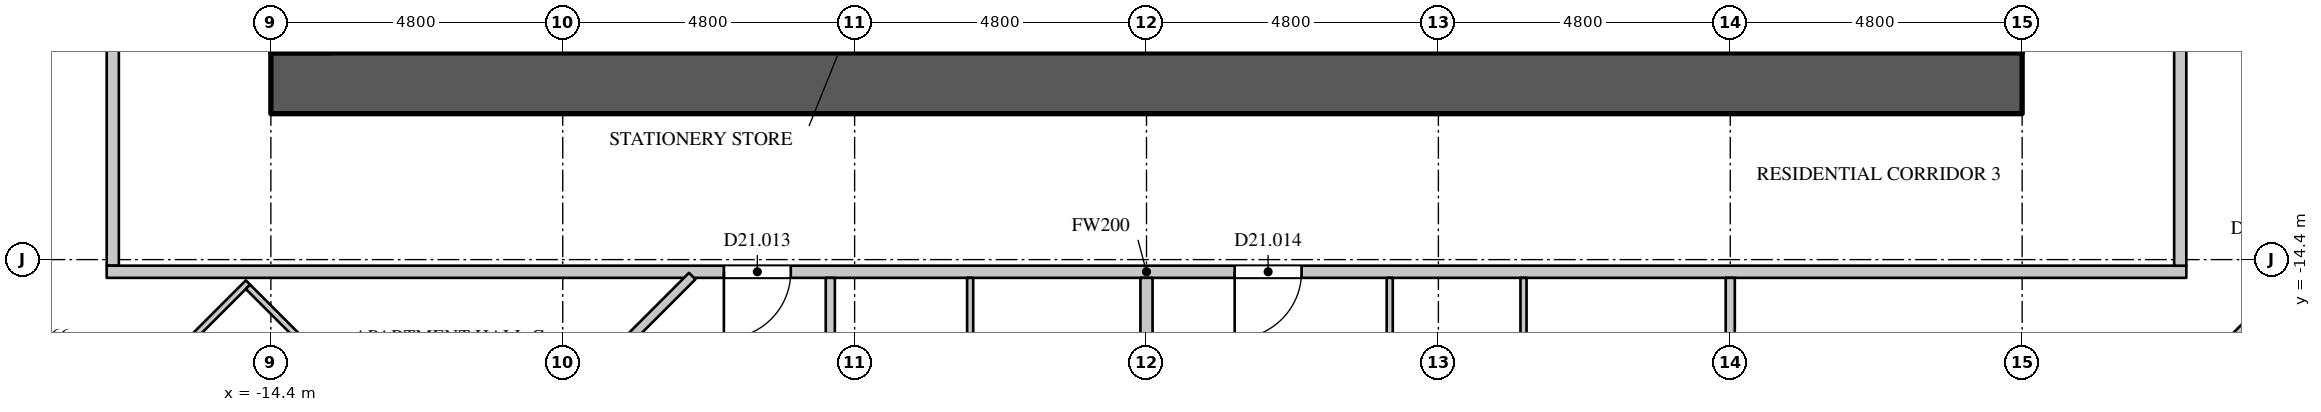
"""IFC4 building model, lengths in metres.
Left out: names, types, materials, properties, quantities, classifications, styles, units other than length and angle.
Written with IfcOpenShell. Run it as: python <this file> out.ifc"""

import sys

from ifc_helpers import new_model, si_unit, direction, frame, frame_2d, origin, place, context, subcontext, project, spatial, rectangle, extrude, element, fill, save


model = new_model("IFC4")
c1 = context("Model", 3, precision=1e-05, world=origin(), true_north=direction((0.0, 1.0)))
c2 = subcontext(c1, "Body", "Model", "MODEL_VIEW")
j1 = project(units=[si_unit("LENGTHUNIT", "METRE"), si_unit("PLANEANGLEUNIT", "RADIAN")], contexts=[c1])
p1 = place(None, origin())
s1 = spatial("IfcSite", under=j1, at=p1, CompositionType="ELEMENT")
p2 = place(p1, origin())
s2 = spatial("IfcBuilding", under=s1, at=p2, CompositionType="ELEMENT")
p3 = place(p2, frame((0.0, 0.0, 92.7)))
s3 = spatial("IfcBuildingStorey", under=s2, at=p3, CompositionType="ELEMENT", Elevation=92.7)
p4 = place(p3, frame((-14.4, -11.5, 0.0), z_axis=(0.0, 0.0, 1.0), x_axis=(1.0, 0.0, 0.0)))
e1 = element("IfcWall", 1, at=p4, inside=s3, PredefinedType="SHEAR", context=c2, shape_type="SweptSolid", body=[
    extrude(rectangle(XDim=28.8, YDim=1.0, at=frame_2d((14.4, 0.0))), origin(), (0.0, 0.0, 1.0), 4.2),
])
p5 = place(p3, frame((-17.0, -14.5, 0.0), z_axis=(0.0, 0.0, 1.0), x_axis=(0.0, 1.0, 0.0)))
e2 = element("IfcWall", 2, at=p5, inside=s3, PredefinedType="PARTITIONING", context=c2, shape_type="SweptSolid", body=[
    extrude(rectangle(XDim=29.0, YDim=0.2, at=frame_2d((14.5, 0.0))), origin(), (0.0, 0.0, 1.0), 3.798),
])
p6 = place(p5, frame((11.55, 0.0, 0.0)))
e3 = element("IfcOpeningElement", 3, at=p6, cuts=e2, PredefinedType="OPENING", context=c2, shape_type="SweptSolid", body=[
    extrude(rectangle(XDim=1.1, YDim=2.4, at=frame_2d((0.55, 1.2))), frame((0.0, 0.11, 0.0), z_axis=(0.0, -1.0, 0.0), x_axis=(1.0, 0.0, 0.0)), (0.0, 0.0, 1.0), 0.22),
])
p7 = place(p3, frame((-17.1, -14.6, 0.0), z_axis=(0.0, 0.0, 1.0), x_axis=(1.0, 0.0, 0.0)))
e4 = element("IfcWall", 4, at=p7, inside=s3, PredefinedType="PARTITIONING", context=c2, shape_type="SweptSolid", body=[
    extrude(rectangle(XDim=34.2, YDim=0.2, at=frame_2d((17.1, 0.0))), origin(), (0.0, 0.0, 1.0), 3.798),
])
p8 = place(p7, frame((10.15, 0.0, 0.0)))
e5 = element("IfcOpeningElement", 5, at=p8, cuts=e4, PredefinedType="OPENING", context=c2, shape_type="SweptSolid", body=[
    extrude(rectangle(XDim=1.1, YDim=2.4, at=frame_2d((0.55, 1.2))), frame((0.0, 0.11, 0.0), z_axis=(0.0, -1.0, 0.0), x_axis=(1.0, 0.0, 0.0)), (0.0, 0.0, 1.0), 0.22),
])
p9 = place(p7, frame((18.55, 0.0, 0.0)))
e6 = element("IfcOpeningElement", 6, at=p9, cuts=e4, PredefinedType="OPENING", context=c2, shape_type="SweptSolid", body=[
    extrude(rectangle(XDim=1.1, YDim=2.4, at=frame_2d((0.55, 1.2))), frame((0.0, 0.11, 0.0), z_axis=(0.0, -1.0, 0.0), x_axis=(1.0, 0.0, 0.0)), (0.0, 0.0, 1.0), 0.22),
])
p10 = place(p3, frame((17.0, -14.5, 0.0), z_axis=(0.0, 0.0, 1.0), x_axis=(0.0, 1.0, 0.0)))
e7 = element("IfcWall", 7, at=p10, inside=s3, PredefinedType="PARTITIONING", context=c2, shape_type="SweptSolid", body=[
    extrude(rectangle(XDim=29.0, YDim=0.2, at=frame_2d((14.5, 0.0))), origin(), (0.0, 0.0, 1.0), 3.798),
])
p11 = place(p10, frame((15.9, 0.0, 0.0)))
e8 = element("IfcOpeningElement", 8, at=p11, cuts=e7, PredefinedType="OPENING", context=c2, shape_type="SweptSolid", body=[
    extrude(rectangle(XDim=1.1, YDim=2.4, at=frame_2d((0.55, 1.2))), frame((0.0, 0.11, 0.0), z_axis=(0.0, -1.0, 0.0), x_axis=(1.0, 0.0, 0.0)), (0.0, 0.0, 1.0), 0.22),
])
p12 = place(p3, frame((-22.947, -12.051, 0.0), z_axis=(0.0, 0.0, 1.0), x_axis=(0.707106781187, -0.707106781187, 0.0)))
e9 = element("IfcWall", 9, at=p12, inside=s3, PredefinedType="PARTITIONING", context=c2, shape_type="SweptSolid", body=[
    extrude(rectangle(XDim=7.63, YDim=0.15, at=frame_2d((3.815, 0.0))), origin(), (0.0, 0.0, 1.0), 3.798),
])
p13 = place(p12, frame((4.65, 0.0, 0.0)))
e10 = element("IfcOpeningElement", 10, at=p13, cuts=e9, PredefinedType="OPENING", context=c2, shape_type="SweptSolid", body=[
    extrude(rectangle(XDim=0.95, YDim=2.2, at=frame_2d((0.475, 1.1))), frame((0.0, 0.085, 0.0), z_axis=(0.0, -1.0, 0.0), x_axis=(1.0, 0.0, 0.0)), (0.0, 0.0, 1.0), 0.17),
])
p14 = place(p3, frame((-9.547, -16.747, 0.0), z_axis=(0.0, 0.0, 1.0), x_axis=(0.707065207457, 0.707148352472, 0.0)))
e11 = element("IfcWall", 11, at=p14, inside=s3, PredefinedType="PARTITIONING", context=c2, shape_type="SweptSolid", body=[
    extrude(rectangle(XDim=2.936, YDim=0.15, at=frame_2d((1.468, 0.0))), origin(), (0.0, 0.0, 1.0), 3.798),
])
p15 = place(p3, frame((-5.2, -21.725, 0.0), z_axis=(0.0, 0.0, 1.0), x_axis=(0.0, 1.0, 0.0)))
e12 = element("IfcWall", 12, at=p15, inside=s3, PredefinedType="PARTITIONING", context=c2, shape_type="SweptSolid", body=[
    extrude(rectangle(XDim=7.025, YDim=0.15, at=frame_2d((3.513, 0.0))), origin(), (0.0, 0.0, 1.0), 3.798),
])
p16 = place(p15, frame((3.05, 0.0, 0.0)))
e13 = element("IfcOpeningElement", 13, at=p16, cuts=e12, PredefinedType="OPENING", context=c2, shape_type="SweptSolid", body=[
    extrude(rectangle(XDim=0.95, YDim=2.2, at=frame_2d((0.475, 1.1))), frame((0.0, 0.085, 0.0), z_axis=(0.0, -1.0, 0.0), x_axis=(1.0, 0.0, 0.0)), (0.0, 0.0, 1.0), 0.17),
])
p17 = place(p3, frame((9.6, -28.855, 0.0), z_axis=(0.0, 0.0, 1.0), x_axis=(0.0, 1.0, 0.0)))
e14 = element("IfcWall", 14, at=p17, inside=s3, PredefinedType="PARTITIONING", context=c2, shape_type="SweptSolid", body=[
    extrude(rectangle(XDim=14.155, YDim=0.15, at=frame_2d((7.078, 0.0))), origin(), (0.0, 0.0, 1.0), 3.798),
])
p18 = place(p17, frame((2.4, 0.0, 0.0)))
e15 = element("IfcOpeningElement", 15, at=p18, cuts=e14, PredefinedType="OPENING", context=c2, shape_type="SweptSolid", body=[
    extrude(rectangle(XDim=1.5, YDim=2.2, at=frame_2d((0.75, 1.1))), frame((0.0, 0.085, 0.0), z_axis=(0.0, -1.0, 0.0), x_axis=(1.0, 0.0, 0.0)), (0.0, 0.0, 1.0), 0.17),
])
p19 = place(p17, frame((10.2, 0.0, 0.0)))
e16 = element("IfcOpeningElement", 16, at=p19, cuts=e14, PredefinedType="OPENING", context=c2, shape_type="SweptSolid", body=[
    extrude(rectangle(XDim=0.95, YDim=2.2, at=frame_2d((0.475, 1.1))), frame((0.0, 0.085, 0.0), z_axis=(0.0, -1.0, 0.0), x_axis=(1.0, 0.0, 0.0)), (0.0, 0.0, 1.0), 0.17),
])
p20 = place(p3, frame((16.739, -16.845, 0.0), z_axis=(0.0, 0.0, 1.0), x_axis=(0.707130070773, 0.707083490833, 0.0)))
e17 = element("IfcWall", 17, at=p20, inside=s3, PredefinedType="PARTITIONING", context=c2, shape_type="SweptSolid", body=[
    extrude(rectangle(XDim=5.241, YDim=0.15, at=frame_2d((2.621, 0.0))), origin(), (0.0, 0.0, 1.0), 3.798),
])
p21 = place(p20, frame((3.3, 0.0, 0.0)))
e18 = element("IfcOpeningElement", 18, at=p21, cuts=e17, PredefinedType="OPENING", context=c2, shape_type="SweptSolid", body=[
    extrude(rectangle(XDim=0.95, YDim=2.2, at=frame_2d((0.475, 1.1))), frame((0.0, 0.085, 0.0), z_axis=(0.0, -1.0, 0.0), x_axis=(1.0, 0.0, 0.0)), (0.0, 0.0, 1.0), 0.17),
])
p22 = place(p3, frame((0.0, -28.855, 0.0), z_axis=(0.0, 0.0, 1.0), x_axis=(0.0, 1.0, 0.0)))
e19 = element("IfcWall", 19, at=p22, inside=s3, PredefinedType="PARTITIONING", context=c2, shape_type="SweptSolid", body=[
    extrude(rectangle(XDim=14.155, YDim=0.2, at=frame_2d((7.078, 0.0))), origin(), (0.0, 0.0, 1.0), 3.798),
])
p23 = place(p3, frame((-17.06, -17.06, 0.0), z_axis=(0.0, 0.0, 1.0), x_axis=(0.707106781187, 0.707106781187, 0.0)))
e20 = element("IfcWall", 20, at=p23, inside=s3, PredefinedType="PARTITIONING", context=c2, shape_type="SweptSolid", body=[
    extrude(rectangle(XDim=3.23, YDim=0.1, at=frame_2d((1.615, 0.0))), origin(), (0.0, 0.0, 1.0), 3.798),
])
p24 = place(p3, frame((-14.776, -14.847, 0.0), z_axis=(0.0, 0.0, 1.0), x_axis=(0.707106781187, -0.707106781187, 0.0)))
e21 = element("IfcWall", 21, at=p24, inside=s3, PredefinedType="PARTITIONING", context=c2, shape_type="SweptSolid", body=[
    extrude(rectangle(XDim=2.5, YDim=0.1, at=frame_2d((1.25, 0.0))), origin(), (0.0, 0.0, 1.0), 3.798),
])
p25 = place(p3, frame((-2.9, -21.725, 0.0), z_axis=(0.0, 0.0, 1.0), x_axis=(0.0, 1.0, 0.0)))
e22 = element("IfcWall", 22, at=p25, inside=s3, PredefinedType="PARTITIONING", context=c2, shape_type="SweptSolid", body=[
    extrude(rectangle(XDim=7.025, YDim=0.1, at=frame_2d((3.513, 0.0))), origin(), (0.0, 0.0, 1.0), 3.798),
])
p26 = place(p3, frame((4.0, -21.75, 0.0), z_axis=(0.0, 0.0, 1.0), x_axis=(0.0, 1.0, 0.0)))
e23 = element("IfcWall", 23, at=p26, inside=s3, PredefinedType="PARTITIONING", context=c2, shape_type="SweptSolid", body=[
    extrude(rectangle(XDim=7.05, YDim=0.1, at=frame_2d((3.525, 0.0))), origin(), (0.0, 0.0, 1.0), 3.798),
])
p27 = place(p26, frame((3.1, 0.0, 0.0)))
e24 = element("IfcOpeningElement", 24, at=p27, cuts=e23, PredefinedType="OPENING", context=c2, shape_type="SweptSolid", body=[
    extrude(rectangle(XDim=0.9, YDim=2.2, at=frame_2d((0.45, 1.1))), frame((0.0, 0.06, 0.0), z_axis=(0.0, -1.0, 0.0), x_axis=(1.0, 0.0, 0.0)), (0.0, 0.0, 1.0), 0.12),
])
p28 = place(p3, frame((6.2, -21.725, 0.0), z_axis=(0.0, 0.0, 1.0), x_axis=(0.0, 1.0, 0.0)))
e25 = element("IfcWall", 25, at=p28, inside=s3, PredefinedType="PARTITIONING", context=c2, shape_type="SweptSolid", body=[
    extrude(rectangle(XDim=7.025, YDim=0.1, at=frame_2d((3.513, 0.0))), origin(), (0.0, 0.0, 1.0), 3.798),
])
p29 = place(p8, origin())
e26 = element("IfcDoor", 26, at=p29, inside=s3, OperationType="SINGLE_SWING_RIGHT", PredefinedType="DOOR", context=c2, shape_type="SweptSolid", body=[
    extrude(rectangle(XDim=1.1, YDim=2.4, at=frame_2d((0.55, 1.2))), frame((0.0, 0.025, 0.0), z_axis=(0.0, -1.0, 0.0), x_axis=(1.0, 0.0, 0.0)), (0.0, 0.0, 1.0), 0.05),
])
fill(e5, e26)
p30 = place(p9, origin())
e27 = element("IfcDoor", 27, at=p30, inside=s3, OperationType="SINGLE_SWING_RIGHT", PredefinedType="DOOR", context=c2, shape_type="SweptSolid", body=[
    extrude(rectangle(XDim=1.1, YDim=2.4, at=frame_2d((0.55, 1.2))), frame((0.0, 0.025, 0.0), z_axis=(0.0, -1.0, 0.0), x_axis=(1.0, 0.0, 0.0)), (0.0, 0.0, 1.0), 0.05),
])
fill(e6, e27)
save(model, sys.argv[1])
